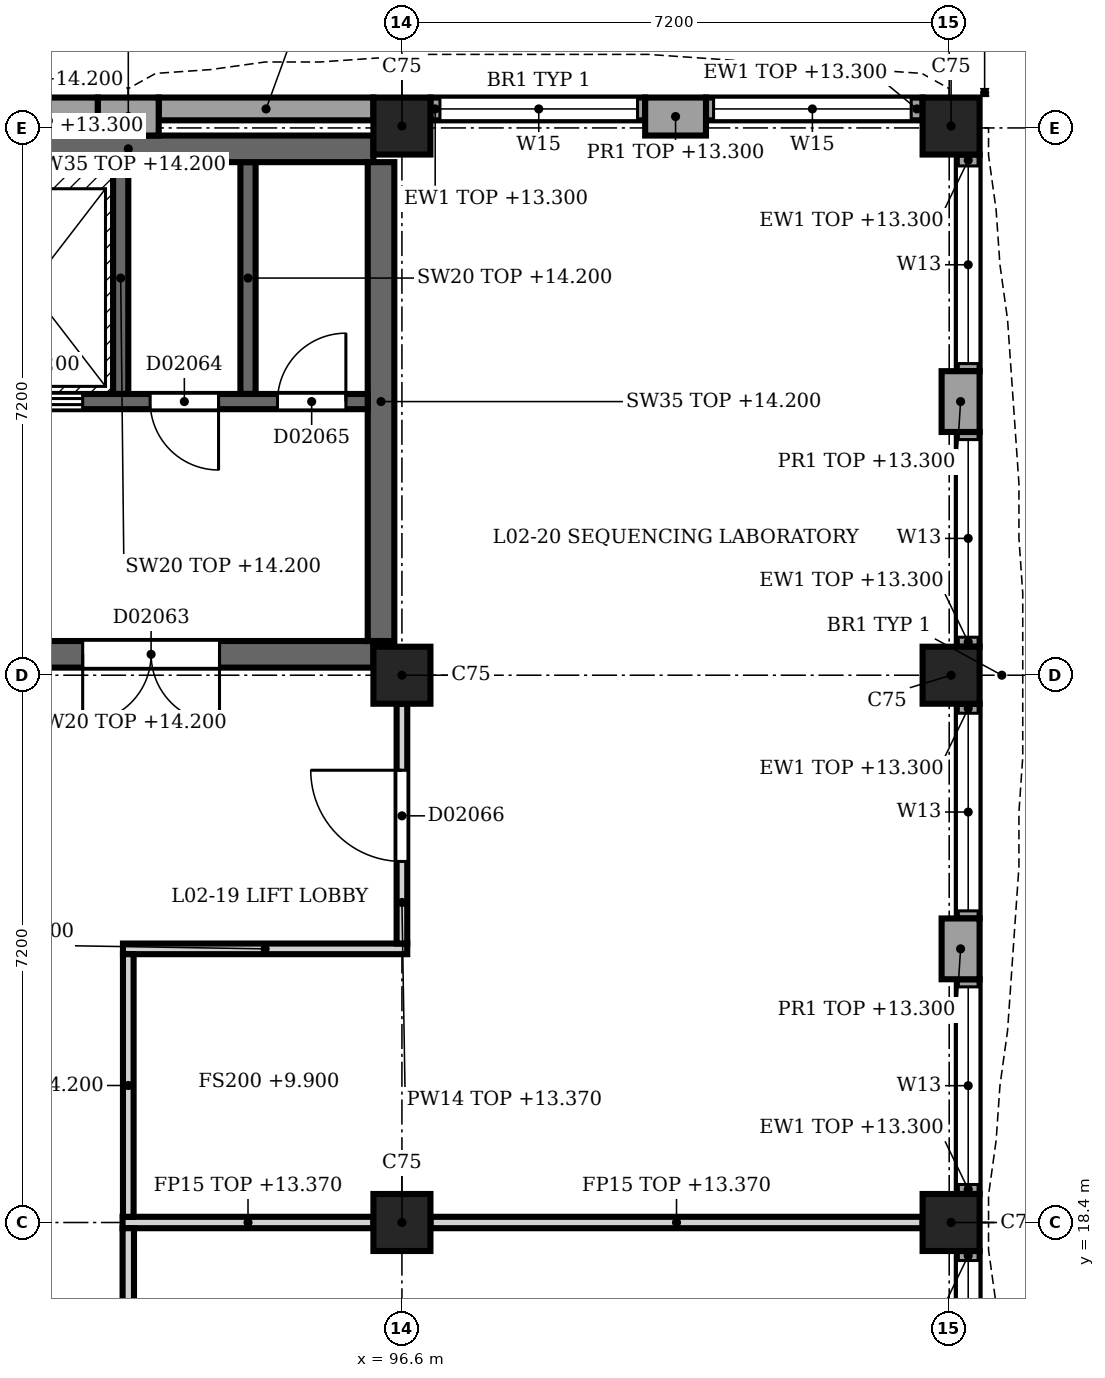
"""IFC4 building model, lengths in metres.
Left out: names, types, materials, properties, quantities, classifications, styles, units other than length and angle.
Written with IfcOpenShell. Run it as: python <this file> out.ifc"""

import sys

from ifc_helpers import new_model, si_unit, direction, frame, frame_2d, origin, origin_2d, place, context, subcontext, project, spatial, rectangle, extrude, element, fill, save


model = new_model("IFC4")
c1 = context("Model", 3, precision=1e-05, world=origin(), true_north=direction((0.0, 1.0)))
c2 = subcontext(c1, "Body", "Model", "MODEL_VIEW")
j1 = project(units=[si_unit("LENGTHUNIT", "METRE"), si_unit("PLANEANGLEUNIT", "RADIAN")], contexts=[c1])
p1 = place(None, origin())
s1 = spatial("IfcSite", under=j1, at=p1, CompositionType="ELEMENT")
p2 = place(p1, origin())
s2 = spatial("IfcBuilding", under=s1, at=p2, CompositionType="ELEMENT")
p3 = place(p2, frame((0.0, 0.0, 9.9)))
s3 = spatial("IfcBuildingStorey", under=s2, at=p3, CompositionType="ELEMENT", Elevation=9.9)
for number, where, z_axis, x_axis in (
    (1, (96.6, 18.4, 0.0), (0.0, 0.0, 1.0), (1.0, 0.0, 0.0)),
    (2, (96.6, 25.6, 0.0), (0.0, 0.0, 1.0), (1.0, 0.0, 0.0)),
    (3, (96.6, 32.825, 0.0), (0.0, 0.0, 1.0), (1.0, 0.0, 0.0)),
    (4, (103.825, 18.4, 0.0), (0.0, 0.0, 1.0), (1.0, 0.0, 0.0)),
    (5, (103.825, 25.6, 0.0), (0.0, 0.0, 1.0), (1.0, 0.0, 0.0)),
    (6, (103.825, 32.825, 0.0), (0.0, 0.0, 1.0), (1.0, 0.0, 0.0)),
):
    element("IfcColumn", number, at=place(p3, frame(where, z_axis=z_axis, x_axis=x_axis)), inside=s3, PredefinedType="COLUMN", context=c2, shape_type="SweptSolid", body=[
        extrude(rectangle(XDim=0.75, YDim=0.75, at=origin_2d()), origin(), (0.0, 0.0, 1.0), 4.5),
    ])
p4 = place(p3, frame((92.6, 32.95, 0.0), z_axis=(0.0, 0.0, 1.0), x_axis=(1.0, 0.0, 0.0)))
e7 = element("IfcWall", 7, at=p4, inside=s3, PredefinedType="SOLIDWALL", context=c2, shape_type="SweptSolid", body=[
    extrude(rectangle(XDim=0.8, YDim=0.5, at=frame_2d((0.4, 0.0))), origin(), (0.0, 0.0, 1.0), 3.4),
])
p5 = place(p3, frame((99.8, 32.95, 0.0), z_axis=(0.0, 0.0, 1.0), x_axis=(1.0, 0.0, 0.0)))
e8 = element("IfcWall", 8, at=p5, inside=s3, PredefinedType="SOLIDWALL", context=c2, shape_type="SweptSolid", body=[
    extrude(rectangle(XDim=0.8, YDim=0.5, at=frame_2d((0.4, 0.0))), origin(), (0.0, 0.0, 1.0), 3.4),
])
for number, where, z_axis, x_axis in (
    (9, (89.775, 33.05, 0.0), (0.0, 0.0, 1.0), (1.0, 0.0, 0.0)),
    (10, (93.4, 33.05, 0.0), (0.0, 0.0, 1.0), (1.0, 0.0, 0.0)),
):
    element("IfcWall", number, at=place(p3, frame(where, z_axis=z_axis, x_axis=x_axis)), inside=s3, PredefinedType="SOLIDWALL", context=c2, shape_type="SweptSolid", body=[
        extrude(rectangle(XDim=2.825, YDim=0.3, at=frame_2d((1.413, 0.0))), origin(), (0.0, 0.0, 1.0), 3.4),
    ])
p6 = place(p3, frame((96.975, 33.05, 0.0), z_axis=(0.0, 0.0, 1.0), x_axis=(1.0, 0.0, 0.0)))
e11 = element("IfcWall", 11, at=p6, inside=s3, PredefinedType="SOLIDWALL", context=c2, shape_type="SweptSolid", body=[
    extrude(rectangle(XDim=2.825, YDim=0.3, at=frame_2d((1.413, 0.0))), origin(), (0.0, 0.0, 1.0), 3.4),
])
p7 = place(p6, frame((0.125, 0.0, 1.0)))
e12 = element("IfcOpeningElement", 12, at=p7, cuts=e11, PredefinedType="OPENING", context=c2, shape_type="SweptSolid", body=[
    extrude(rectangle(XDim=2.6, YDim=2.0, at=frame_2d((1.3, 1.0))), frame((0.0, 0.16, 0.0), z_axis=(0.0, -1.0, 0.0), x_axis=(1.0, 0.0, 0.0)), (0.0, 0.0, 1.0), 0.32),
])
p8 = place(p3, frame((100.6, 33.05, 0.0), z_axis=(0.0, 0.0, 1.0), x_axis=(1.0, 0.0, 0.0)))
e13 = element("IfcWall", 13, at=p8, inside=s3, PredefinedType="SOLIDWALL", context=c2, shape_type="SweptSolid", body=[
    extrude(rectangle(XDim=2.85, YDim=0.3, at=frame_2d((1.425, 0.0))), origin(), (0.0, 0.0, 1.0), 3.4),
])
p9 = place(p8, frame((0.1, 0.0, 1.0)))
e14 = element("IfcOpeningElement", 14, at=p9, cuts=e13, PredefinedType="OPENING", context=c2, shape_type="SweptSolid", body=[
    extrude(rectangle(XDim=2.6, YDim=2.0, at=frame_2d((1.3, 1.0))), frame((0.0, 0.16, 0.0), z_axis=(0.0, -1.0, 0.0), x_axis=(1.0, 0.0, 0.0)), (0.0, 0.0, 1.0), 0.32),
])
p10 = place(p3, frame((103.95, 29.6, 0.0), z_axis=(0.0, 0.0, 1.0), x_axis=(0.0, -1.0, 0.0)))
e15 = element("IfcWall", 15, at=p10, inside=s3, PredefinedType="SOLIDWALL", context=c2, shape_type="SweptSolid", body=[
    extrude(rectangle(XDim=0.8, YDim=0.5, at=frame_2d((0.4, 0.0))), origin(), (0.0, 0.0, 1.0), 3.4),
])
p11 = place(p3, frame((103.95, 22.4, 0.0), z_axis=(0.0, 0.0, 1.0), x_axis=(0.0, -1.0, 0.0)))
e16 = element("IfcWall", 16, at=p11, inside=s3, PredefinedType="SOLIDWALL", context=c2, shape_type="SweptSolid", body=[
    extrude(rectangle(XDim=0.8, YDim=0.5, at=frame_2d((0.4, 0.0))), origin(), (0.0, 0.0, 1.0), 3.4),
])
p12 = place(p3, frame((104.05, 32.45, 0.0), z_axis=(0.0, 0.0, 1.0), x_axis=(0.0, -1.0, 0.0)))
e17 = element("IfcWall", 17, at=p12, inside=s3, PredefinedType="SOLIDWALL", context=c2, shape_type="SweptSolid", body=[
    extrude(rectangle(XDim=2.85, YDim=0.3, at=frame_2d((1.425, 0.0))), origin(), (0.0, 0.0, 1.0), 3.4),
])
p13 = place(p12, frame((0.15, 0.0, 0.9)))
e18 = element("IfcOpeningElement", 18, at=p13, cuts=e17, PredefinedType="OPENING", context=c2, shape_type="SweptSolid", body=[
    extrude(rectangle(XDim=2.6, YDim=2.2, at=frame_2d((1.3, 1.1))), frame((0.0, 0.16, 0.0), z_axis=(0.0, -1.0, 0.0), x_axis=(1.0, 0.0, 0.0)), (0.0, 0.0, 1.0), 0.32),
])
p14 = place(p3, frame((104.05, 28.8, 0.0), z_axis=(0.0, 0.0, 1.0), x_axis=(0.0, -1.0, 0.0)))
e19 = element("IfcWall", 19, at=p14, inside=s3, PredefinedType="SOLIDWALL", context=c2, shape_type="SweptSolid", body=[
    extrude(rectangle(XDim=2.825, YDim=0.3, at=frame_2d((1.413, 0.0))), origin(), (0.0, 0.0, 1.0), 3.4),
])
p15 = place(p14, frame((0.1, 0.0, 0.9)))
e20 = element("IfcOpeningElement", 20, at=p15, cuts=e19, PredefinedType="OPENING", context=c2, shape_type="SweptSolid", body=[
    extrude(rectangle(XDim=2.6, YDim=2.2, at=frame_2d((1.3, 1.1))), frame((0.0, 0.16, 0.0), z_axis=(0.0, -1.0, 0.0), x_axis=(1.0, 0.0, 0.0)), (0.0, 0.0, 1.0), 0.32),
])
p16 = place(p3, frame((104.05, 25.225, 0.0), z_axis=(0.0, 0.0, 1.0), x_axis=(0.0, -1.0, 0.0)))
e21 = element("IfcWall", 21, at=p16, inside=s3, PredefinedType="SOLIDWALL", context=c2, shape_type="SweptSolid", body=[
    extrude(rectangle(XDim=2.825, YDim=0.3, at=frame_2d((1.413, 0.0))), origin(), (0.0, 0.0, 1.0), 3.4),
])
p17 = place(p16, frame((0.125, 0.0, 0.9)))
e22 = element("IfcOpeningElement", 22, at=p17, cuts=e21, PredefinedType="OPENING", context=c2, shape_type="SweptSolid", body=[
    extrude(rectangle(XDim=2.6, YDim=2.2, at=frame_2d((1.3, 1.1))), frame((0.0, 0.16, 0.0), z_axis=(0.0, -1.0, 0.0), x_axis=(1.0, 0.0, 0.0)), (0.0, 0.0, 1.0), 0.32),
])
p18 = place(p3, frame((104.05, 21.6, 0.0), z_axis=(0.0, 0.0, 1.0), x_axis=(0.0, -1.0, 0.0)))
e23 = element("IfcWall", 23, at=p18, inside=s3, PredefinedType="SOLIDWALL", context=c2, shape_type="SweptSolid", body=[
    extrude(rectangle(XDim=2.825, YDim=0.3, at=frame_2d((1.413, 0.0))), origin(), (0.0, 0.0, 1.0), 3.4),
])
p19 = place(p18, frame((0.1, 0.0, 0.9)))
e24 = element("IfcOpeningElement", 24, at=p19, cuts=e23, PredefinedType="OPENING", context=c2, shape_type="SweptSolid", body=[
    extrude(rectangle(XDim=2.6, YDim=2.2, at=frame_2d((1.3, 1.1))), frame((0.0, 0.16, 0.0), z_axis=(0.0, -1.0, 0.0), x_axis=(1.0, 0.0, 0.0)), (0.0, 0.0, 1.0), 0.32),
])
p20 = place(p3, frame((104.05, 18.025, 0.0), z_axis=(0.0, 0.0, 1.0), x_axis=(0.0, -1.0, 0.0)))
e25 = element("IfcWall", 25, at=p20, inside=s3, PredefinedType="SOLIDWALL", context=c2, shape_type="SweptSolid", body=[
    extrude(rectangle(XDim=2.825, YDim=0.3, at=frame_2d((1.413, 0.0))), origin(), (0.0, 0.0, 1.0), 3.4),
])
p21 = place(p20, frame((0.125, 0.0, 0.9)))
e26 = element("IfcOpeningElement", 26, at=p21, cuts=e25, PredefinedType="OPENING", context=c2, shape_type="SweptSolid", body=[
    extrude(rectangle(XDim=2.6, YDim=2.2, at=frame_2d((1.3, 1.1))), frame((0.0, 0.16, 0.0), z_axis=(0.0, -1.0, 0.0), x_axis=(1.0, 0.0, 0.0)), (0.0, 0.0, 1.0), 0.32),
])
p22 = place(p3, frame((89.775, 25.875, 0.0), z_axis=(0.0, 0.0, 1.0), x_axis=(1.0, 0.0, 0.0)))
e27 = element("IfcWall", 27, at=p22, inside=s3, PredefinedType="SHEAR", context=c2, shape_type="SweptSolid", body=[
    extrude(rectangle(XDim=6.45, YDim=0.35, at=frame_2d((3.225, 0.0))), origin(), (0.0, 0.0, 1.0), 4.3),
])
p23 = place(p22, frame((2.625, 0.0, 0.0)))
e28 = element("IfcOpeningElement", 28, at=p23, cuts=e27, PredefinedType="OPENING", context=c2, shape_type="SweptSolid", body=[
    extrude(rectangle(XDim=1.8, YDim=2.1, at=frame_2d((0.9, 1.05))), frame((0.0, 0.185, 0.0), z_axis=(0.0, -1.0, 0.0), x_axis=(1.0, 0.0, 0.0)), (0.0, 0.0, 1.0), 0.37),
])
p24 = place(p3, frame((89.775, 32.525, 0.0), z_axis=(0.0, 0.0, 1.0), x_axis=(1.0, 0.0, 0.0)))
e29 = element("IfcWall", 29, at=p24, inside=s3, PredefinedType="SHEAR", context=c2, shape_type="SweptSolid", body=[
    extrude(rectangle(XDim=6.45, YDim=0.35, at=frame_2d((3.225, 0.0))), origin(), (0.0, 0.0, 1.0), 4.3),
])
p25 = place(p3, frame((96.325, 26.05, 0.0), z_axis=(0.0, 0.0, 1.0), x_axis=(0.0, 1.0, 0.0)))
e30 = element("IfcWall", 30, at=p25, inside=s3, PredefinedType="SHEAR", context=c2, shape_type="SweptSolid", body=[
    extrude(rectangle(XDim=6.3, YDim=0.35, at=frame_2d((3.15, 0.0))), origin(), (0.0, 0.0, 1.0), 4.3),
])
p26 = place(p3, frame((96.15, 29.2, 0.0), z_axis=(0.0, 0.0, 1.0), x_axis=(-1.0, 0.0, 0.0)))
e31 = element("IfcWall", 31, at=p26, inside=s3, PredefinedType="SHEAR", context=c2, shape_type="SweptSolid", body=[
    extrude(rectangle(XDim=10.35, YDim=0.2, at=frame_2d((5.175, 0.0))), origin(), (0.0, 0.0, 1.0), 4.3),
])
p27 = place(p26, frame((8.8, 0.0, 0.0)))
e32 = element("IfcOpeningElement", 32, at=p27, cuts=e31, PredefinedType="OPENING", context=c2, shape_type="SweptSolid", body=[
    extrude(rectangle(XDim=1.1, YDim=2.1, at=frame_2d((0.55, 1.05))), frame((0.0, 0.11, 0.0), z_axis=(0.0, -1.0, 0.0), x_axis=(1.0, 0.0, 0.0)), (0.0, 0.0, 1.0), 0.22),
])
p28 = place(p26, frame((6.6, 0.0, 0.0)))
e33 = element("IfcOpeningElement", 33, at=p28, cuts=e31, PredefinedType="OPENING", context=c2, shape_type="SweptSolid", body=[
    extrude(rectangle(XDim=1.1, YDim=2.1, at=frame_2d((0.55, 1.05))), frame((0.0, 0.11, 0.0), z_axis=(0.0, -1.0, 0.0), x_axis=(1.0, 0.0, 0.0)), (0.0, 0.0, 1.0), 0.22),
])
p29 = place(p26, frame((3.75, 0.0, 0.0)))
e34 = element("IfcOpeningElement", 34, at=p29, cuts=e31, PredefinedType="OPENING", context=c2, shape_type="SweptSolid", body=[
    extrude(rectangle(XDim=1.4, YDim=2.1, at=frame_2d((0.7, 1.05))), frame((0.0, 0.11, 0.0), z_axis=(0.0, -1.0, 0.0), x_axis=(1.0, 0.0, 0.0)), (0.0, 0.0, 1.0), 0.22),
])
p30 = place(p26, frame((1.962, 0.0, 0.0)))
e35 = element("IfcOpeningElement", 35, at=p30, cuts=e31, PredefinedType="OPENING", context=c2, shape_type="SweptSolid", body=[
    extrude(rectangle(XDim=0.9, YDim=2.1, at=frame_2d((0.45, 1.05))), frame((0.0, 0.11, 0.0), z_axis=(0.0, -1.0, 0.0), x_axis=(1.0, 0.0, 0.0)), (0.0, 0.0, 1.0), 0.22),
])
p31 = place(p26, frame((0.288, 0.0, 0.0)))
e36 = element("IfcOpeningElement", 36, at=p31, cuts=e31, PredefinedType="OPENING", context=c2, shape_type="SweptSolid", body=[
    extrude(rectangle(XDim=0.9, YDim=2.1, at=frame_2d((0.45, 1.05))), frame((0.0, 0.11, 0.0), z_axis=(0.0, -1.0, 0.0), x_axis=(1.0, 0.0, 0.0)), (0.0, 0.0, 1.0), 0.22),
])
for number, where, z_axis, x_axis in (
    (37, (92.9, 29.3, 0.0), (0.0, 0.0, 1.0), (0.0, 1.0, 0.0)),
    (38, (94.575, 29.3, 0.0), (0.0, 0.0, 1.0), (0.0, 1.0, 0.0)),
):
    element("IfcWall", number, at=place(p3, frame(where, z_axis=z_axis, x_axis=x_axis)), inside=s3, PredefinedType="SHEAR", context=c2, shape_type="SweptSolid", body=[
        extrude(rectangle(XDim=3.05, YDim=0.2, at=frame_2d((1.525, 0.0))), origin(), (0.0, 0.0, 1.0), 4.3),
    ])
p32 = place(p3, frame((92.925, 18.4, 0.0), z_axis=(0.0, 0.0, 1.0), x_axis=(1.0, 0.0, 0.0)))
e39 = element("IfcWall", 39, at=p32, inside=s3, PredefinedType="PARTITIONING", context=c2, shape_type="SweptSolid", body=[
    extrude(rectangle(XDim=3.3, YDim=0.15, at=frame_2d((1.65, 0.0))), origin(), (0.0, 0.0, 1.0), 3.47),
])
p33 = place(p3, frame((96.975, 18.4, 0.0), z_axis=(0.0, 0.0, 1.0), x_axis=(1.0, 0.0, 0.0)))
e40 = element("IfcWall", 40, at=p33, inside=s3, PredefinedType="PARTITIONING", context=c2, shape_type="SweptSolid", body=[
    extrude(rectangle(XDim=6.475, YDim=0.15, at=frame_2d((3.237, 0.0))), origin(), (0.0, 0.0, 1.0), 3.47),
])
p34 = place(p3, frame((92.93, 22.0, 0.0), z_axis=(0.0, 0.0, 1.0), x_axis=(1.0, 0.0, 0.0)))
e41 = element("IfcWall", 41, at=p34, inside=s3, PredefinedType="PARTITIONING", context=c2, shape_type="SweptSolid", body=[
    extrude(rectangle(XDim=3.74, YDim=0.14, at=frame_2d((1.87, 0.0))), origin(), (0.0, 0.0, 1.0), 4.3),
])
p35 = place(p3, frame((93.0, 18.325, 0.0), z_axis=(0.0, 0.0, 1.0), x_axis=(0.0, -1.0, 0.0)))
e42 = element("IfcWall", 42, at=p35, inside=s3, PredefinedType="PARTITIONING", context=c2, shape_type="SweptSolid", body=[
    extrude(rectangle(XDim=3.45, YDim=0.15, at=frame_2d((1.725, 0.0))), origin(), (0.0, 0.0, 1.0), 3.77),
])
p36 = place(p35, frame((1.175, 0.0, 0.0)))
e43 = element("IfcOpeningElement", 43, at=p36, cuts=e42, PredefinedType="OPENING", context=c2, shape_type="SweptSolid", body=[
    extrude(rectangle(XDim=1.0, YDim=2.3, at=frame_2d((0.5, 1.15))), frame((0.0, 0.085, 0.0), z_axis=(0.0, -1.0, 0.0), x_axis=(1.0, 0.0, 0.0)), (0.0, 0.0, 1.0), 0.17),
])
p37 = place(p3, frame((93.0, 18.475, 0.0), z_axis=(0.0, 0.0, 1.0), x_axis=(0.0, 1.0, 0.0)))
e44 = element("IfcWall", 44, at=p37, inside=s3, PredefinedType="PARTITIONING", context=c2, shape_type="SweptSolid", body=[
    extrude(rectangle(XDim=3.455, YDim=0.14, at=frame_2d((1.728, 0.0))), origin(), (0.0, 0.0, 1.0), 4.3),
])
p38 = place(p3, frame((96.6, 25.225, 0.0), z_axis=(0.0, 0.0, 1.0), x_axis=(0.0, -1.0, 0.0)))
e45 = element("IfcWall", 45, at=p38, inside=s3, PredefinedType="PARTITIONING", context=c2, shape_type="SweptSolid", body=[
    extrude(rectangle(XDim=3.155, YDim=0.14, at=frame_2d((1.578, 0.0))), origin(), (0.0, 0.0, 1.0), 3.47),
])
p39 = place(p38, frame((0.875, 0.0, 0.0)))
e46 = element("IfcOpeningElement", 46, at=p39, cuts=e45, PredefinedType="OPENING", context=c2, shape_type="SweptSolid", body=[
    extrude(rectangle(XDim=1.2, YDim=2.1, at=frame_2d((0.6, 1.05))), frame((0.0, 0.08, 0.0), z_axis=(0.0, -1.0, 0.0), x_axis=(1.0, 0.0, 0.0)), (0.0, 0.0, 1.0), 0.16),
])
p40 = place(p7, origin())
e47 = element("IfcWindow", 47, at=p40, inside=s3, PartitioningType="SINGLE_PANEL", PredefinedType="WINDOW", context=c2, shape_type="SweptSolid", body=[
    extrude(rectangle(XDim=2.6, YDim=2.0, at=frame_2d((1.3, 1.0))), frame((0.0, 0.03, 0.0), z_axis=(0.0, -1.0, 0.0), x_axis=(1.0, 0.0, 0.0)), (0.0, 0.0, 1.0), 0.06),
])
fill(e12, e47)
p41 = place(p9, origin())
e48 = element("IfcWindow", 48, at=p41, inside=s3, PartitioningType="SINGLE_PANEL", PredefinedType="WINDOW", context=c2, shape_type="SweptSolid", body=[
    extrude(rectangle(XDim=2.6, YDim=2.0, at=frame_2d((1.3, 1.0))), frame((0.0, 0.03, 0.0), z_axis=(0.0, -1.0, 0.0), x_axis=(1.0, 0.0, 0.0)), (0.0, 0.0, 1.0), 0.06),
])
fill(e14, e48)
p42 = place(p13, origin())
e49 = element("IfcWindow", 49, at=p42, inside=s3, PartitioningType="SINGLE_PANEL", PredefinedType="WINDOW", context=c2, shape_type="SweptSolid", body=[
    extrude(rectangle(XDim=2.6, YDim=2.2, at=frame_2d((1.3, 1.1))), frame((0.0, 0.03, 0.0), z_axis=(0.0, -1.0, 0.0), x_axis=(1.0, 0.0, 0.0)), (0.0, 0.0, 1.0), 0.06),
])
fill(e18, e49)
p43 = place(p15, origin())
e50 = element("IfcWindow", 50, at=p43, inside=s3, PartitioningType="SINGLE_PANEL", PredefinedType="WINDOW", context=c2, shape_type="SweptSolid", body=[
    extrude(rectangle(XDim=2.6, YDim=2.2, at=frame_2d((1.3, 1.1))), frame((0.0, 0.03, 0.0), z_axis=(0.0, -1.0, 0.0), x_axis=(1.0, 0.0, 0.0)), (0.0, 0.0, 1.0), 0.06),
])
fill(e20, e50)
p44 = place(p17, origin())
e51 = element("IfcWindow", 51, at=p44, inside=s3, PartitioningType="SINGLE_PANEL", PredefinedType="WINDOW", context=c2, shape_type="SweptSolid", body=[
    extrude(rectangle(XDim=2.6, YDim=2.2, at=frame_2d((1.3, 1.1))), frame((0.0, 0.03, 0.0), z_axis=(0.0, -1.0, 0.0), x_axis=(1.0, 0.0, 0.0)), (0.0, 0.0, 1.0), 0.06),
])
fill(e22, e51)
p45 = place(p19, origin())
e52 = element("IfcWindow", 52, at=p45, inside=s3, PartitioningType="SINGLE_PANEL", PredefinedType="WINDOW", context=c2, shape_type="SweptSolid", body=[
    extrude(rectangle(XDim=2.6, YDim=2.2, at=frame_2d((1.3, 1.1))), frame((0.0, 0.03, 0.0), z_axis=(0.0, -1.0, 0.0), x_axis=(1.0, 0.0, 0.0)), (0.0, 0.0, 1.0), 0.06),
])
fill(e24, e52)
p46 = place(p21, origin())
e53 = element("IfcWindow", 53, at=p46, inside=s3, PartitioningType="SINGLE_PANEL", PredefinedType="WINDOW", context=c2, shape_type="SweptSolid", body=[
    extrude(rectangle(XDim=2.6, YDim=2.2, at=frame_2d((1.3, 1.1))), frame((0.0, 0.03, 0.0), z_axis=(0.0, -1.0, 0.0), x_axis=(1.0, 0.0, 0.0)), (0.0, 0.0, 1.0), 0.06),
])
fill(e26, e53)
p47 = place(p23, origin())
e54 = element("IfcDoor", 54, at=p47, inside=s3, OperationType="SINGLE_SWING_LEFT", PredefinedType="DOOR", context=c2, shape_type="SweptSolid", body=[
    extrude(rectangle(XDim=1.8, YDim=2.1, at=frame_2d((0.9, 1.05))), frame((0.0, 0.025, 0.0), z_axis=(0.0, -1.0, 0.0), x_axis=(1.0, 0.0, 0.0)), (0.0, 0.0, 1.0), 0.05),
])
fill(e28, e54)
p48 = place(p29, origin())
e55 = element("IfcDoor", 55, at=p48, inside=s3, OperationType="DOUBLE_DOOR_SLIDING", PredefinedType="DOOR", context=c2, shape_type="SweptSolid", body=[
    extrude(rectangle(XDim=1.4, YDim=2.1, at=frame_2d((0.7, 1.05))), frame((0.0, 0.025, 0.0), z_axis=(0.0, -1.0, 0.0), x_axis=(1.0, 0.0, 0.0)), (0.0, 0.0, 1.0), 0.05),
])
fill(e34, e55)
p49 = place(p30, origin())
e56 = element("IfcDoor", 56, at=p49, inside=s3, OperationType="SINGLE_SWING_LEFT", PredefinedType="DOOR", context=c2, shape_type="SweptSolid", body=[
    extrude(rectangle(XDim=0.9, YDim=2.1, at=frame_2d((0.45, 1.05))), frame((0.0, 0.025, 0.0), z_axis=(0.0, -1.0, 0.0), x_axis=(1.0, 0.0, 0.0)), (0.0, 0.0, 1.0), 0.05),
])
fill(e35, e56)
p50 = place(p31, origin())
e57 = element("IfcDoor", 57, at=p50, inside=s3, OperationType="SINGLE_SWING_LEFT", PredefinedType="DOOR", context=c2, shape_type="SweptSolid", body=[
    extrude(rectangle(XDim=0.9, YDim=2.1, at=frame_2d((0.45, 1.05))), frame((0.0, 0.025, 0.0), z_axis=(0.0, -1.0, 0.0), x_axis=(1.0, 0.0, 0.0)), (0.0, 0.0, 1.0), 0.05),
])
fill(e36, e57)
p51 = place(p39, origin())
e58 = element("IfcDoor", 58, at=p51, inside=s3, OperationType="SINGLE_SWING_LEFT", PredefinedType="DOOR", context=c2, shape_type="SweptSolid", body=[
    extrude(rectangle(XDim=1.2, YDim=2.1, at=frame_2d((0.6, 1.05))), frame((0.0, 0.025, 0.0), z_axis=(0.0, -1.0, 0.0), x_axis=(1.0, 0.0, 0.0)), (0.0, 0.0, 1.0), 0.05),
])
fill(e46, e58)
save(model, sys.argv[1])
